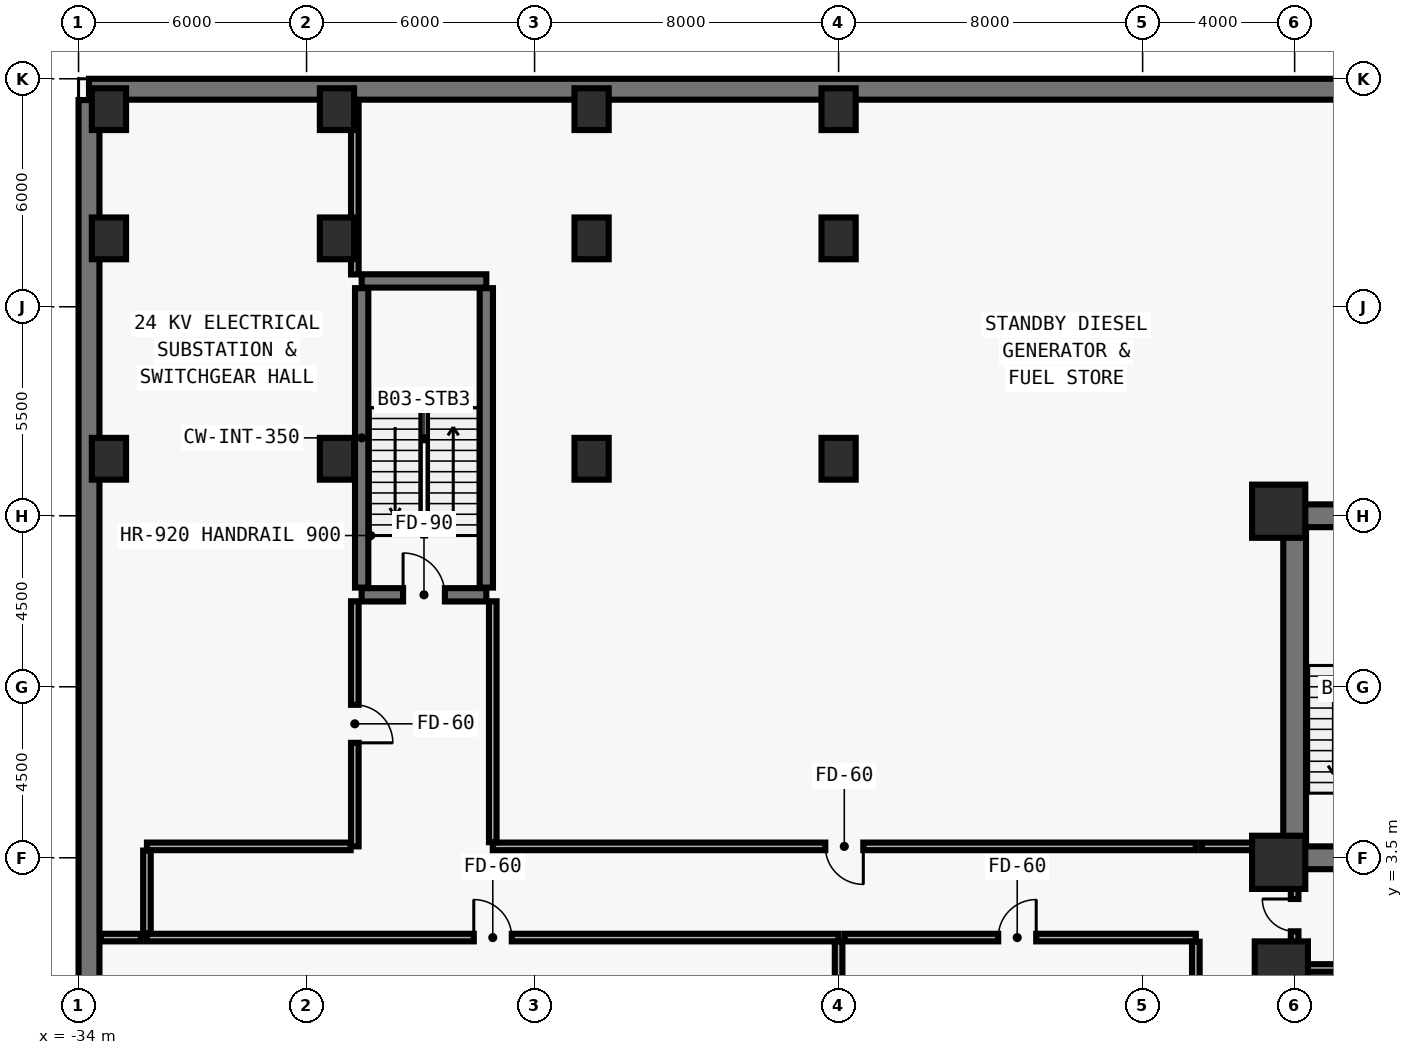
"""IFC4 building model, lengths in metres.
Left out: names, types, materials, properties, quantities, classifications, styles, units other than length and angle.
Written with IfcOpenShell. Run it as: python <this file> out.ifc"""

import sys

from ifc_helpers import new_model, si_unit, direction, frame, frame_2d, origin, origin_2d, place, context, subcontext, project, spatial, rectangle, extrude, element, fill, save


model = new_model("IFC4")
c1 = context("Model", 3, precision=1e-05, world=origin(), true_north=direction((0.0, 1.0)))
c2 = subcontext(c1, "Body", "Model", "MODEL_VIEW")
j1 = project(units=[si_unit("LENGTHUNIT", "METRE"), si_unit("PLANEANGLEUNIT", "RADIAN")], contexts=[c1])
p1 = place(None, origin())
s1 = spatial("IfcSite", under=j1, at=p1, CompositionType="ELEMENT")
p2 = place(p1, origin())
s2 = spatial("IfcBuilding", under=s1, at=p2, CompositionType="ELEMENT")
p3 = place(p2, frame((0.0, 0.0, -13.5)))
s3 = spatial("IfcBuildingStorey", under=s2, at=p3, CompositionType="ELEMENT", Elevation=-13.5)
p4 = place(p3, frame((-26.55, 10.42, 0.0), z_axis=(0.0, 0.0, 1.0), x_axis=(1.0, 0.0, 0.0)))
e1 = element("IfcWall", 1, at=p4, inside=s3, PredefinedType="SHEAR", context=c2, shape_type="SweptSolid", body=[
    extrude(rectangle(XDim=3.28, YDim=0.35, at=frame_2d((1.64, 0.0))), origin(), (0.0, 0.0, 1.0), 4.492),
])
p5 = place(p4, frame((1.09, 0.0, 0.0)))
e2 = element("IfcOpeningElement", 2, at=p5, cuts=e1, PredefinedType="OPENING", context=c2, shape_type="SweptSolid", body=[
    extrude(rectangle(XDim=1.1, YDim=2.15, at=frame_2d((0.55, 1.075))), frame((0.0, 0.185, 0.0), z_axis=(0.0, -1.0, 0.0), x_axis=(1.0, 0.0, 0.0)), (0.0, 0.0, 1.0), 0.37),
])
p6 = place(p3, frame((-26.55, 18.68, 0.0), z_axis=(0.0, 0.0, 1.0), x_axis=(1.0, 0.0, 0.0)))
e3 = element("IfcWall", 3, at=p6, inside=s3, PredefinedType="SHEAR", context=c2, shape_type="SweptSolid", body=[
    extrude(rectangle(XDim=3.28, YDim=0.35, at=frame_2d((1.64, 0.0))), origin(), (0.0, 0.0, 1.0), 4.492),
])
for number, where, z_axis, x_axis in (
    (4, (-26.55, 10.61, 0.0), (0.0, 0.0, 1.0), (0.0, 1.0, 0.0)),
    (5, (-23.27, 10.61, 0.0), (0.0, 0.0, 1.0), (0.0, 1.0, 0.0)),
):
    element("IfcWall", number, at=place(p3, frame(where, z_axis=z_axis, x_axis=x_axis)), inside=s3, PredefinedType="SHEAR", context=c2, shape_type="SweptSolid", body=[
        extrude(rectangle(XDim=7.88, YDim=0.35, at=frame_2d((3.94, 0.0))), origin(), (0.0, 0.0, 1.0), 4.492),
    ])
p7 = place(p3, frame((-2.0, 3.5, 0.0), z_axis=(0.0, 0.0, 1.0), x_axis=(1.0, 0.0, 0.0)))
e6 = element("IfcWall", 6, at=p7, inside=s3, PredefinedType="SHEAR", context=c2, shape_type="SweptSolid", body=[
    extrude(rectangle(XDim=10.0, YDim=0.6, at=frame_2d((5.0, 0.0))), origin(), (0.0, 0.0, 1.0), 4.492),
])
p8 = place(p7, frame((1.65, 0.0, 0.0)))
e7 = element("IfcOpeningElement", 7, at=p8, cuts=e6, PredefinedType="OPENING", context=c2, shape_type="SweptSolid", body=[
    extrude(rectangle(XDim=1.1, YDim=2.15, at=frame_2d((0.55, 1.075))), frame((0.0, 0.31, 0.0), z_axis=(0.0, -1.0, 0.0), x_axis=(1.0, 0.0, 0.0)), (0.0, 0.0, 1.0), 0.62),
])
p9 = place(p7, frame((7.65, 0.0, 0.0)))
e8 = element("IfcOpeningElement", 8, at=p9, cuts=e6, PredefinedType="OPENING", context=c2, shape_type="SweptSolid", body=[
    extrude(rectangle(XDim=1.1, YDim=2.15, at=frame_2d((0.55, 1.075))), frame((0.0, 0.31, 0.0), z_axis=(0.0, -1.0, 0.0), x_axis=(1.0, 0.0, 0.0)), (0.0, 0.0, 1.0), 0.62),
])
p10 = place(p7, frame((3.72, 0.0, 0.0)))
e9 = element("IfcOpeningElement", 9, at=p10, cuts=e6, PredefinedType="OPENING", context=c2, shape_type="SweptSolid", body=[
    extrude(rectangle(XDim=1.1, YDim=2.2, at=frame_2d((0.55, 1.1))), frame((0.0, 0.31, 0.0), z_axis=(0.0, -1.0, 0.0), x_axis=(1.0, 0.0, 0.0)), (0.0, 0.0, 1.0), 0.62),
])
p11 = place(p7, frame((5.18, 0.0, 0.0)))
e10 = element("IfcOpeningElement", 10, at=p11, cuts=e6, PredefinedType="OPENING", context=c2, shape_type="SweptSolid", body=[
    extrude(rectangle(XDim=1.1, YDim=2.2, at=frame_2d((0.55, 1.1))), frame((0.0, 0.31, 0.0), z_axis=(0.0, -1.0, 0.0), x_axis=(1.0, 0.0, 0.0)), (0.0, 0.0, 1.0), 0.62),
])
p12 = place(p3, frame((-2.0, 12.5, 0.0), z_axis=(0.0, 0.0, 1.0), x_axis=(1.0, 0.0, 0.0)))
e11 = element("IfcWall", 11, at=p12, inside=s3, PredefinedType="SHEAR", context=c2, shape_type="SweptSolid", body=[
    extrude(rectangle(XDim=10.0, YDim=0.6, at=frame_2d((5.0, 0.0))), origin(), (0.0, 0.0, 1.0), 4.492),
])
p13 = place(p12, frame((4.45, 0.0, 0.0)))
e12 = element("IfcOpeningElement", 12, at=p13, cuts=e11, PredefinedType="OPENING", context=c2, shape_type="SweptSolid", body=[
    extrude(rectangle(XDim=0.85, YDim=2.1, at=frame_2d((0.425, 1.05))), frame((0.0, 0.31, 0.0), z_axis=(0.0, -1.0, 0.0), x_axis=(1.0, 0.0, 0.0)), (0.0, 0.0, 1.0), 0.62),
])
p14 = place(p3, frame((-2.0, 3.81, 0.0), z_axis=(0.0, 0.0, 1.0), x_axis=(0.0, 1.0, 0.0)))
e13 = element("IfcWall", 13, at=p14, inside=s3, PredefinedType="SHEAR", context=c2, shape_type="SweptSolid", body=[
    extrude(rectangle(XDim=8.38, YDim=0.6, at=frame_2d((4.19, 0.0))), origin(), (0.0, 0.0, 1.0), 4.492),
])
p15 = place(p3, frame((-33.725, 23.725, 0.0), z_axis=(0.0, 0.0, 1.0), x_axis=(1.0, 0.0, 0.0)))
e14 = element("IfcWall", 14, at=p15, inside=s3, PredefinedType="SOLIDWALL", context=c2, shape_type="SweptSolid", body=[
    extrude(rectangle(XDim=67.45, YDim=0.55, at=frame_2d((33.725, 0.0))), origin(), (0.0, 0.0, 1.0), 4.492),
])
p16 = place(p3, frame((-33.725, -23.44, 0.0), z_axis=(0.0, 0.0, 1.0), x_axis=(0.0, 1.0, 0.0)))
e15 = element("IfcWall", 15, at=p16, inside=s3, PredefinedType="SOLIDWALL", context=c2, shape_type="SweptSolid", body=[
    extrude(rectangle(XDim=46.88, YDim=0.55, at=frame_2d((23.44, 0.0))), origin(), (0.0, 0.0, 1.0), 4.492),
])
for number, where, z_axis, x_axis in (
    (16, (-2.42, 12.62, 0.0), (0.0, 0.0, 1.0), (1.0, 0.0, 0.0)),
    (17, (-2.42, 3.38, 0.0), (0.0, 0.0, 1.0), (1.0, 0.0, 0.0)),
    (18, (-2.35, 0.6, 0.0), (0.0, 0.0, 1.0), (1.0, 0.0, 0.0)),
):
    element("IfcColumn", number, at=place(p3, frame(where, z_axis=z_axis, x_axis=x_axis)), inside=s3, PredefinedType="COLUMN", context=c2, shape_type="SweptSolid", body=[
        extrude(rectangle(XDim=1.4, YDim=1.4, at=origin_2d()), origin(), (0.0, 0.0, 1.0), 4.475),
    ])
for number, where, z_axis, x_axis in (
    (19, (-33.2, 14.0, 0.0), (0.0, 0.0, 1.0), (1.0, 0.0, 0.0)),
    (20, (-33.2, 19.8, 0.0), (0.0, 0.0, 1.0), (1.0, 0.0, 0.0)),
    (21, (-33.2, 23.2, 0.0), (0.0, 0.0, 1.0), (1.0, 0.0, 0.0)),
    (22, (-27.2, 14.0, 0.0), (0.0, 0.0, 1.0), (1.0, 0.0, 0.0)),
    (23, (-27.2, 19.8, 0.0), (0.0, 0.0, 1.0), (1.0, 0.0, 0.0)),
    (24, (-27.2, 23.2, 0.0), (0.0, 0.0, 1.0), (1.0, 0.0, 0.0)),
    (25, (-20.5, 14.0, 0.0), (0.0, 0.0, 1.0), (1.0, 0.0, 0.0)),
    (26, (-20.5, 19.8, 0.0), (0.0, 0.0, 1.0), (1.0, 0.0, 0.0)),
    (27, (-20.5, 23.2, 0.0), (0.0, 0.0, 1.0), (1.0, 0.0, 0.0)),
    (28, (-14.0, 14.0, 0.0), (0.0, 0.0, 1.0), (1.0, 0.0, 0.0)),
    (29, (-14.0, 19.8, 0.0), (0.0, 0.0, 1.0), (1.0, 0.0, 0.0)),
    (30, (-14.0, 23.2, 0.0), (0.0, 0.0, 1.0), (1.0, 0.0, 0.0)),
):
    element("IfcColumn", number, at=place(p3, frame(where, z_axis=z_axis, x_axis=x_axis)), inside=s3, PredefinedType="COLUMN", context=c2, shape_type="SweptSolid", body=[
        extrude(rectangle(XDim=0.9, YDim=1.1, at=origin_2d()), origin(), (0.0, 0.0, 1.0), 4.475),
    ])
p17 = place(p3, frame((-2.0, 0.72, 0.0), z_axis=(0.0, 0.0, 1.0), x_axis=(0.0, 1.0, 0.0)))
e31 = element("IfcWall", 31, at=p17, inside=s3, PredefinedType="MOVABLE", context=c2, shape_type="SweptSolid", body=[
    extrude(rectangle(XDim=2.25, YDim=0.2, at=frame_2d((1.125, 0.0))), origin(), (0.0, 0.0, 1.0), 3.262),
])
p18 = place(p17, frame((0.845, 0.0, 0.0)))
e32 = element("IfcOpeningElement", 32, at=p18, cuts=e31, PredefinedType="OPENING", context=c2, shape_type="SweptSolid", body=[
    extrude(rectangle(XDim=0.85, YDim=2.1, at=frame_2d((0.425, 1.05))), frame((0.0, 0.11, 0.0), z_axis=(0.0, -1.0, 0.0), x_axis=(1.0, 0.0, 0.0)), (0.0, 0.0, 1.0), 0.22),
])
p19 = place(p3, frame((-32.2, 1.4, 0.0), z_axis=(0.0, 0.0, 1.0), x_axis=(1.0, 0.0, 0.0)))
e33 = element("IfcWall", 33, at=p19, inside=s3, PredefinedType="MOVABLE", context=c2, shape_type="SweptSolid", body=[
    extrude(rectangle(XDim=18.2, YDim=0.2, at=frame_2d((9.1, 0.0))), origin(), (0.0, 0.0, 1.0), 4.18),
])
p20 = place(p19, frame((8.6, 0.0, 0.0)))
e34 = element("IfcOpeningElement", 34, at=p20, cuts=e33, PredefinedType="OPENING", context=c2, shape_type="SweptSolid", body=[
    extrude(rectangle(XDim=1.0, YDim=2.1, at=frame_2d((0.5, 1.05))), frame((0.0, 0.11, 0.0), z_axis=(0.0, -1.0, 0.0), x_axis=(1.0, 0.0, 0.0)), (0.0, 0.0, 1.0), 0.22),
])
p21 = place(p3, frame((-13.84, 1.4, 0.0), z_axis=(0.0, 0.0, 1.0), x_axis=(1.0, 0.0, 0.0)))
e35 = element("IfcWall", 35, at=p21, inside=s3, PredefinedType="MOVABLE", context=c2, shape_type="SweptSolid", body=[
    extrude(rectangle(XDim=9.24, YDim=0.2, at=frame_2d((4.62, 0.0))), origin(), (0.0, 0.0, 1.0), 4.18),
])
p22 = place(p21, frame((4.04, 0.0, 0.0)))
e36 = element("IfcOpeningElement", 36, at=p22, cuts=e35, PredefinedType="OPENING", context=c2, shape_type="SweptSolid", body=[
    extrude(rectangle(XDim=1.0, YDim=2.1, at=frame_2d((0.5, 1.05))), frame((0.0, 0.11, 0.0), z_axis=(0.0, -1.0, 0.0), x_axis=(1.0, 0.0, 0.0)), (0.0, 0.0, 1.0), 0.22),
])
p23 = place(p3, frame((-26.73, 10.25, 0.0), z_axis=(0.0, 0.0, 1.0), x_axis=(0.0, -1.0, 0.0)))
e37 = element("IfcWall", 37, at=p23, inside=s3, PredefinedType="MOVABLE", context=c2, shape_type="SweptSolid", body=[
    extrude(rectangle(XDim=6.45, YDim=0.2, at=frame_2d((3.225, 0.0))), origin(), (0.0, 0.0, 1.0), 4.18),
])
p24 = place(p23, frame((2.725, 0.0, 0.0)))
e38 = element("IfcOpeningElement", 38, at=p24, cuts=e37, PredefinedType="OPENING", context=c2, shape_type="SweptSolid", body=[
    extrude(rectangle(XDim=1.0, YDim=2.1, at=frame_2d((0.5, 1.05))), frame((0.0, 0.11, 0.0), z_axis=(0.0, -1.0, 0.0), x_axis=(1.0, 0.0, 0.0)), (0.0, 0.0, 1.0), 0.22),
])
p25 = place(p3, frame((-4.6, 3.8, 0.0), z_axis=(0.0, 0.0, 1.0), x_axis=(-1.0, 0.0, 0.0)))
e39 = element("IfcWall", 39, at=p25, inside=s3, PredefinedType="MOVABLE", context=c2, shape_type="SweptSolid", body=[
    extrude(rectangle(XDim=18.5, YDim=0.2, at=frame_2d((9.25, 0.0))), origin(), (0.0, 0.0, 1.0), 4.18),
])
p26 = place(p25, frame((8.75, 0.0, 0.0)))
e40 = element("IfcOpeningElement", 40, at=p26, cuts=e39, PredefinedType="OPENING", context=c2, shape_type="SweptSolid", body=[
    extrude(rectangle(XDim=1.0, YDim=2.1, at=frame_2d((0.5, 1.05))), frame((0.0, 0.11, 0.0), z_axis=(0.0, -1.0, 0.0), x_axis=(1.0, 0.0, 0.0)), (0.0, 0.0, 1.0), 0.22),
])
p27 = place(p3, frame((-1.88, 0.6, 0.0), z_axis=(0.0, 0.0, 1.0), x_axis=(1.0, 0.0, 0.0)))
e41 = element("IfcWall", 41, at=p27, inside=s3, PredefinedType="MOVABLE", context=c2, shape_type="SweptSolid", body=[
    extrude(rectangle(XDim=5.72, YDim=0.2, at=frame_2d((2.86, 0.0))), origin(), (0.0, 0.0, 1.0), 3.362),
])
p28 = place(p3, frame((-2.0, -4.09, 0.0), z_axis=(0.0, 0.0, 1.0), x_axis=(0.0, 1.0, 0.0)))
e42 = element("IfcWall", 42, at=p28, inside=s3, PredefinedType="MOVABLE", context=c2, shape_type="SweptSolid", body=[
    extrude(rectangle(XDim=4.59, YDim=0.2, at=frame_2d((2.295, 0.0))), origin(), (0.0, 0.0, 1.0), 3.362),
])
p29 = place(p3, frame((-4.6, 1.29, 0.0), z_axis=(0.0, 0.0, 1.0), x_axis=(0.0, -1.0, 0.0)))
e43 = element("IfcWall", 43, at=p29, inside=s3, PredefinedType="MOVABLE", context=c2, shape_type="SweptSolid", body=[
    extrude(rectangle(XDim=5.49, YDim=0.2, at=frame_2d((2.745, 0.0))), origin(), (0.0, 0.0, 1.0), 4.18),
])
p30 = place(p3, frame((-26.84, 3.8, 0.0), z_axis=(0.0, 0.0, 1.0), x_axis=(-1.0, 0.0, 0.0)))
e44 = element("IfcWall", 44, at=p30, inside=s3, PredefinedType="MOVABLE", context=c2, shape_type="SweptSolid", body=[
    extrude(rectangle(XDim=5.36, YDim=0.2, at=frame_2d((2.68, 0.0))), origin(), (0.0, 0.0, 1.0), 4.18),
])
p31 = place(p3, frame((-32.2, 3.69, 0.0), z_axis=(0.0, 0.0, 1.0), x_axis=(0.0, -1.0, 0.0)))
e45 = element("IfcWall", 45, at=p31, inside=s3, PredefinedType="MOVABLE", context=c2, shape_type="SweptSolid", body=[
    extrude(rectangle(XDim=2.18, YDim=0.2, at=frame_2d((1.09, 0.0))), origin(), (0.0, 0.0, 1.0), 4.18),
])
p32 = place(p3, frame((-23.1, 3.91, 0.0), z_axis=(0.0, 0.0, 1.0), x_axis=(0.0, 1.0, 0.0)))
e46 = element("IfcWall", 46, at=p32, inside=s3, PredefinedType="MOVABLE", context=c2, shape_type="SweptSolid", body=[
    extrude(rectangle(XDim=6.34, YDim=0.2, at=frame_2d((3.17, 0.0))), origin(), (0.0, 0.0, 1.0), 4.18),
])
p33 = place(p3, frame((-2.36, 3.8, 0.0), z_axis=(0.0, 0.0, 1.0), x_axis=(-1.0, 0.0, 0.0)))
e47 = element("IfcWall", 47, at=p33, inside=s3, PredefinedType="MOVABLE", context=c2, shape_type="SweptSolid", body=[
    extrude(rectangle(XDim=2.08, YDim=0.2, at=frame_2d((1.04, 0.0))), origin(), (0.0, 0.0, 1.0), 4.18),
])
p34 = place(p3, frame((-14.0, 1.29, 0.0), z_axis=(0.0, 0.0, 1.0), x_axis=(0.0, -1.0, 0.0)))
e48 = element("IfcWall", 48, at=p34, inside=s3, PredefinedType="MOVABLE", context=c2, shape_type="SweptSolid", body=[
    extrude(rectangle(XDim=24.705, YDim=0.2, at=frame_2d((12.353, 0.0))), origin(), (0.0, 0.0, 1.0), 3.462),
])
p35 = place(p3, frame((-33.415, 1.4, 0.0), z_axis=(0.0, 0.0, 1.0), x_axis=(1.0, 0.0, 0.0)))
e49 = element("IfcWall", 49, at=p35, inside=s3, PredefinedType="MOVABLE", context=c2, shape_type="SweptSolid", body=[
    extrude(rectangle(XDim=1.055, YDim=0.2, at=frame_2d((0.527, 0.0))), origin(), (0.0, 0.0, 1.0), 4.18),
])
p36 = place(p3, frame((-26.73, 23.415, 0.0), z_axis=(0.0, 0.0, 1.0), x_axis=(0.0, -1.0, 0.0)))
e50 = element("IfcWall", 50, at=p36, inside=s3, PredefinedType="MOVABLE", context=c2, shape_type="SweptSolid", body=[
    extrude(rectangle(XDim=4.565, YDim=0.2, at=frame_2d((2.282, 0.0))), origin(), (0.0, 0.0, 1.0), 3.462),
])
p37 = place(p5, origin())
e51 = element("IfcDoor", 51, at=p37, inside=s3, OperationType="SINGLE_SWING_LEFT", PredefinedType="DOOR", context=c2, shape_type="SweptSolid", body=[
    extrude(rectangle(XDim=1.1, YDim=2.15, at=frame_2d((0.55, 1.075))), frame((0.0, 0.025, 0.0), z_axis=(0.0, -1.0, 0.0), x_axis=(1.0, 0.0, 0.0)), (0.0, 0.0, 1.0), 0.05),
])
fill(e2, e51)
p38 = place(p18, origin())
e52 = element("IfcDoor", 52, at=p38, inside=s3, OperationType="SINGLE_SWING_RIGHT", PredefinedType="DOOR", context=c2, shape_type="SweptSolid", body=[
    extrude(rectangle(XDim=0.85, YDim=2.1, at=frame_2d((0.425, 1.05))), frame((0.0, 0.025, 0.0), z_axis=(0.0, -1.0, 0.0), x_axis=(1.0, 0.0, 0.0)), (0.0, 0.0, 1.0), 0.05),
])
fill(e32, e52)
p39 = place(p20, origin())
e53 = element("IfcDoor", 53, at=p39, inside=s3, OperationType="SINGLE_SWING_LEFT", PredefinedType="DOOR", context=c2, shape_type="SweptSolid", body=[
    extrude(rectangle(XDim=1.0, YDim=2.1, at=frame_2d((0.5, 1.05))), frame((0.0, 0.025, 0.0), z_axis=(0.0, -1.0, 0.0), x_axis=(1.0, 0.0, 0.0)), (0.0, 0.0, 1.0), 0.05),
])
fill(e34, e53)
p40 = place(p22, origin())
e54 = element("IfcDoor", 54, at=p40, inside=s3, OperationType="SINGLE_SWING_RIGHT", PredefinedType="DOOR", context=c2, shape_type="SweptSolid", body=[
    extrude(rectangle(XDim=1.0, YDim=2.1, at=frame_2d((0.5, 1.05))), frame((0.0, 0.025, 0.0), z_axis=(0.0, -1.0, 0.0), x_axis=(1.0, 0.0, 0.0)), (0.0, 0.0, 1.0), 0.05),
])
fill(e36, e54)
p41 = place(p24, origin())
e55 = element("IfcDoor", 55, at=p41, inside=s3, OperationType="SINGLE_SWING_RIGHT", PredefinedType="DOOR", context=c2, shape_type="SweptSolid", body=[
    extrude(rectangle(XDim=1.0, YDim=2.1, at=frame_2d((0.5, 1.05))), frame((0.0, 0.025, 0.0), z_axis=(0.0, -1.0, 0.0), x_axis=(1.0, 0.0, 0.0)), (0.0, 0.0, 1.0), 0.05),
])
fill(e38, e55)
p42 = place(p26, origin())
e56 = element("IfcDoor", 56, at=p42, inside=s3, OperationType="SINGLE_SWING_LEFT", PredefinedType="DOOR", context=c2, shape_type="SweptSolid", body=[
    extrude(rectangle(XDim=1.0, YDim=2.1, at=frame_2d((0.5, 1.05))), frame((0.0, 0.025, 0.0), z_axis=(0.0, -1.0, 0.0), x_axis=(1.0, 0.0, 0.0)), (0.0, 0.0, 1.0), 0.05),
])
fill(e40, e56)
save(model, sys.argv[1])
